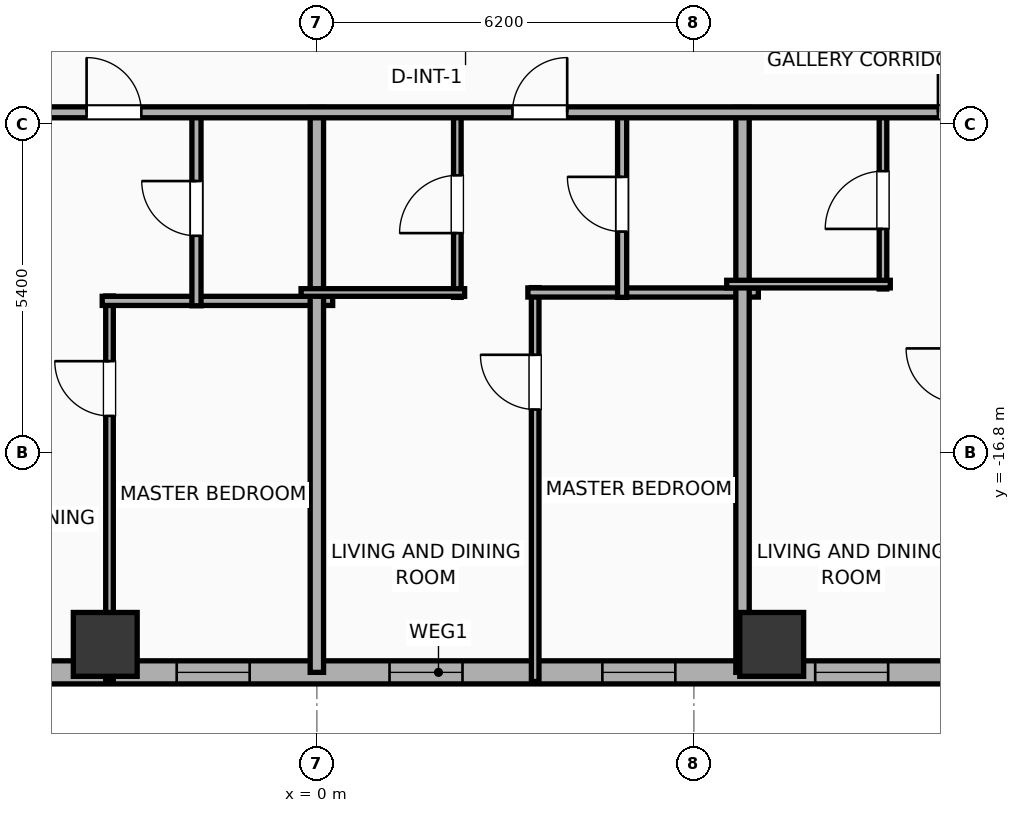
"""IFC4 building model, lengths in metres.
Left out: names, types, materials, properties, quantities, classifications, styles, units other than length and angle.
Written with IfcOpenShell. Run it as: python <this file> out.ifc"""

import sys

from ifc_helpers import new_model, si_unit, direction, frame, frame_2d, origin, origin_2d, place, context, subcontext, project, spatial, rectangle, hollow_rectangle, extrude, element, fill, save


model = new_model("IFC4")
c1 = context("Model", 3, precision=1e-05, world=origin(), true_north=direction((0.0, 1.0)))
c2 = subcontext(c1, "Body", "Model", "MODEL_VIEW")
j1 = project(units=[si_unit("LENGTHUNIT", "METRE"), si_unit("PLANEANGLEUNIT", "RADIAN")], contexts=[c1])
p1 = place(None, origin())
s1 = spatial("IfcSite", under=j1, at=p1, CompositionType="ELEMENT")
p2 = place(p1, origin())
s2 = spatial("IfcBuilding", under=s1, at=p2, CompositionType="ELEMENT")
p3 = place(p2, frame((0.0, 0.0, 120.9)))
s3 = spatial("IfcBuildingStorey", under=s2, at=p3, CompositionType="ELEMENT", Elevation=120.9)
for number, where, z_axis, x_axis in (
    (1, (-3.48, -19.95, 0.0), (0.0, 0.0, 1.0), (1.0, 0.0, 0.0)),
    (2, (7.48, -19.95, 0.0), (0.0, 0.0, 1.0), (1.0, 0.0, 0.0)),
):
    element("IfcColumn", number, at=place(p3, frame(where, z_axis=z_axis, x_axis=x_axis)), inside=s3, PredefinedType="COLUMN", context=c2, shape_type="SweptSolid", body=[
        extrude(hollow_rectangle(XDim=1.05, YDim=1.05, WallThickness=0.036, at=origin_2d()), origin(), (0.0, 0.0, 1.0), 3.9),
    ])
p4 = place(p3, frame((29.381, -20.41, 0.0), z_axis=(0.0, 0.0, 1.0), x_axis=(-1.0, 0.0, 0.0)))
e3 = element("IfcWall", 3, at=p4, inside=s3, PredefinedType="ELEMENTEDWALL", context=c2, shape_type="SweptSolid", body=[
    extrude(rectangle(XDim=54.763, YDim=0.38, at=frame_2d((27.381, 0.0))), origin(), (0.0, 0.0, 1.0), 3.65),
])
p5 = place(p4, frame((5.645, 0.0, 0.75)))
e4 = element("IfcOpeningElement", 4, at=p5, cuts=e3, PredefinedType="OPENING", context=c2, shape_type="SweptSolid", body=[
    extrude(rectangle(XDim=2.4, YDim=2.1, at=frame_2d((1.2, 1.05))), frame((0.0, 0.2, 0.0), z_axis=(0.0, -1.0, 0.0), x_axis=(1.0, 0.0, 0.0)), (0.0, 0.0, 1.0), 0.4),
])
p6 = place(p4, frame((47.567, 0.0, 0.75)))
e5 = element("IfcOpeningElement", 5, at=p6, cuts=e3, PredefinedType="OPENING", context=c2, shape_type="SweptSolid", body=[
    extrude(rectangle(XDim=2.4, YDim=2.1, at=frame_2d((1.2, 1.05))), frame((0.0, 0.2, 0.0), z_axis=(0.0, -1.0, 0.0), x_axis=(1.0, 0.0, 0.0)), (0.0, 0.0, 1.0), 0.4),
])
p7 = place(p4, frame((51.831, 0.0, 0.75)))
e6 = element("IfcOpeningElement", 6, at=p7, cuts=e3, PredefinedType="OPENING", context=c2, shape_type="SweptSolid", body=[
    extrude(rectangle(XDim=1.2, YDim=2.05, at=frame_2d((0.6, 1.025))), frame((0.0, 0.2, 0.0), z_axis=(0.0, -1.0, 0.0), x_axis=(1.0, 0.0, 0.0)), (0.0, 0.0, 1.0), 0.4),
])
p8 = place(p4, frame((44.606, 0.0, 0.75)))
e7 = element("IfcOpeningElement", 7, at=p8, cuts=e3, PredefinedType="OPENING", context=c2, shape_type="SweptSolid", body=[
    extrude(rectangle(XDim=1.2, YDim=2.05, at=frame_2d((0.6, 1.025))), frame((0.0, 0.2, 0.0), z_axis=(0.0, -1.0, 0.0), x_axis=(1.0, 0.0, 0.0)), (0.0, 0.0, 1.0), 0.4),
])
p9 = place(p4, frame((40.986, 0.0, 0.75)))
e8 = element("IfcOpeningElement", 8, at=p9, cuts=e3, PredefinedType="OPENING", context=c2, shape_type="SweptSolid", body=[
    extrude(rectangle(XDim=1.2, YDim=2.05, at=frame_2d((0.6, 1.025))), frame((0.0, 0.2, 0.0), z_axis=(0.0, -1.0, 0.0), x_axis=(1.0, 0.0, 0.0)), (0.0, 0.0, 1.0), 0.4),
])
p10 = place(p4, frame((37.486, 0.0, 0.75)))
e9 = element("IfcOpeningElement", 9, at=p10, cuts=e3, PredefinedType="OPENING", context=c2, shape_type="SweptSolid", body=[
    extrude(rectangle(XDim=1.2, YDim=2.05, at=frame_2d((0.6, 1.025))), frame((0.0, 0.2, 0.0), z_axis=(0.0, -1.0, 0.0), x_axis=(1.0, 0.0, 0.0)), (0.0, 0.0, 1.0), 0.4),
])
p11 = place(p4, frame((33.986, 0.0, 0.75)))
e10 = element("IfcOpeningElement", 10, at=p11, cuts=e3, PredefinedType="OPENING", context=c2, shape_type="SweptSolid", body=[
    extrude(rectangle(XDim=1.2, YDim=2.05, at=frame_2d((0.6, 1.025))), frame((0.0, 0.2, 0.0), z_axis=(0.0, -1.0, 0.0), x_axis=(1.0, 0.0, 0.0)), (0.0, 0.0, 1.0), 0.4),
])
p12 = place(p4, frame((30.486, 0.0, 0.75)))
e11 = element("IfcOpeningElement", 11, at=p12, cuts=e3, PredefinedType="OPENING", context=c2, shape_type="SweptSolid", body=[
    extrude(rectangle(XDim=1.2, YDim=2.05, at=frame_2d((0.6, 1.025))), frame((0.0, 0.2, 0.0), z_axis=(0.0, -1.0, 0.0), x_axis=(1.0, 0.0, 0.0)), (0.0, 0.0, 1.0), 0.4),
])
p13 = place(p4, frame((26.986, 0.0, 0.75)))
e12 = element("IfcOpeningElement", 12, at=p13, cuts=e3, PredefinedType="OPENING", context=c2, shape_type="SweptSolid", body=[
    extrude(rectangle(XDim=1.2, YDim=2.05, at=frame_2d((0.6, 1.025))), frame((0.0, 0.2, 0.0), z_axis=(0.0, -1.0, 0.0), x_axis=(1.0, 0.0, 0.0)), (0.0, 0.0, 1.0), 0.4),
])
p14 = place(p4, frame((23.486, 0.0, 0.75)))
e13 = element("IfcOpeningElement", 13, at=p14, cuts=e3, PredefinedType="OPENING", context=c2, shape_type="SweptSolid", body=[
    extrude(rectangle(XDim=1.2, YDim=2.05, at=frame_2d((0.6, 1.025))), frame((0.0, 0.2, 0.0), z_axis=(0.0, -1.0, 0.0), x_axis=(1.0, 0.0, 0.0)), (0.0, 0.0, 1.0), 0.4),
])
p15 = place(p4, frame((19.986, 0.0, 0.75)))
e14 = element("IfcOpeningElement", 14, at=p15, cuts=e3, PredefinedType="OPENING", context=c2, shape_type="SweptSolid", body=[
    extrude(rectangle(XDim=1.2, YDim=2.05, at=frame_2d((0.6, 1.025))), frame((0.0, 0.2, 0.0), z_axis=(0.0, -1.0, 0.0), x_axis=(1.0, 0.0, 0.0)), (0.0, 0.0, 1.0), 0.4),
])
p16 = place(p4, frame((16.486, 0.0, 0.75)))
e15 = element("IfcOpeningElement", 15, at=p16, cuts=e3, PredefinedType="OPENING", context=c2, shape_type="SweptSolid", body=[
    extrude(rectangle(XDim=1.2, YDim=2.05, at=frame_2d((0.6, 1.025))), frame((0.0, 0.2, 0.0), z_axis=(0.0, -1.0, 0.0), x_axis=(1.0, 0.0, 0.0)), (0.0, 0.0, 1.0), 0.4),
])
p17 = place(p4, frame((11.698, 0.0, 0.75)))
e16 = element("IfcOpeningElement", 16, at=p17, cuts=e3, PredefinedType="OPENING", context=c2, shape_type="SweptSolid", body=[
    extrude(rectangle(XDim=1.2, YDim=2.05, at=frame_2d((0.6, 1.025))), frame((0.0, 0.2, 0.0), z_axis=(0.0, -1.0, 0.0), x_axis=(1.0, 0.0, 0.0)), (0.0, 0.0, 1.0), 0.4),
])
p18 = place(p4, frame((3.172, 0.0, 0.75)))
e17 = element("IfcOpeningElement", 17, at=p18, cuts=e3, PredefinedType="OPENING", context=c2, shape_type="SweptSolid", body=[
    extrude(rectangle(XDim=1.2, YDim=2.05, at=frame_2d((0.6, 1.025))), frame((0.0, 0.2, 0.0), z_axis=(0.0, -1.0, 0.0), x_axis=(1.0, 0.0, 0.0)), (0.0, 0.0, 1.0), 0.4),
])
p19 = place(p4, frame((1.13, 0.0, 0.75)))
e18 = element("IfcOpeningElement", 18, at=p19, cuts=e3, PredefinedType="OPENING", context=c2, shape_type="SweptSolid", body=[
    extrude(rectangle(XDim=1.2, YDim=2.05, at=frame_2d((0.6, 1.025))), frame((0.0, 0.2, 0.0), z_axis=(0.0, -1.0, 0.0), x_axis=(1.0, 0.0, 0.0)), (0.0, 0.0, 1.0), 0.4),
])
p20 = place(p3, frame((-3.41, -20.56, 0.0), z_axis=(0.0, 0.0, 1.0), x_axis=(0.0, 1.0, 0.0)))
e19 = element("IfcWall", 19, at=p20, inside=s3, PredefinedType="PARTITIONING", context=c2, shape_type="SweptSolid", body=[
    extrude(rectangle(XDim=6.339, YDim=0.125, at=frame_2d((3.169, 0.0))), origin(), (0.0, 0.0, 1.0), 3.04),
])
p21 = place(p20, frame((4.368, 0.0, 0.0)))
e20 = element("IfcOpeningElement", 20, at=p21, cuts=e19, PredefinedType="OPENING", context=c2, shape_type="SweptSolid", body=[
    extrude(rectangle(XDim=0.9, YDim=2.05, at=frame_2d((0.45, 1.025))), frame((0.0, 0.073, 0.0), z_axis=(0.0, -1.0, 0.0), x_axis=(1.0, 0.0, 0.0)), (0.0, 0.0, 1.0), 0.145),
])
p22 = place(p3, frame((-3.53, -14.301, 0.0), z_axis=(0.0, 0.0, 1.0), x_axis=(1.0, 0.0, 0.0)))
e21 = element("IfcWall", 21, at=p22, inside=s3, PredefinedType="PLUMBINGWALL", context=c2, shape_type="SweptSolid", body=[
    extrude(rectangle(XDim=3.79, YDim=0.15, at=frame_2d((1.895, 0.0))), origin(), (0.0, 0.0, 1.0), 3.65),
])
p23 = place(p3, frame((-1.98, -14.381, 0.0), z_axis=(0.0, 0.0, 1.0), x_axis=(0.0, 1.0, 0.0)))
e22 = element("IfcWall", 22, at=p23, inside=s3, PredefinedType="PLUMBINGWALL", context=c2, shape_type="SweptSolid", body=[
    extrude(rectangle(XDim=3.201, YDim=0.15, at=frame_2d((1.601, 0.0))), origin(), (0.0, 0.0, 1.0), 3.65),
])
p24 = place(p23, frame((1.15, 0.0, 0.0)))
e23 = element("IfcOpeningElement", 23, at=p24, cuts=e22, PredefinedType="OPENING", context=c2, shape_type="SweptSolid", body=[
    extrude(rectangle(XDim=0.9, YDim=2.05, at=frame_2d((0.45, 1.025))), frame((0.0, 0.085, 0.0), z_axis=(0.0, -1.0, 0.0), x_axis=(1.0, 0.0, 0.0)), (0.0, 0.0, 1.0), 0.17),
])
p25 = place(p3, frame((0.0, -20.41, 0.0), z_axis=(0.0, 0.0, 1.0), x_axis=(0.0, 1.0, 0.0)))
e24 = element("IfcWall", 24, at=p25, inside=s3, PredefinedType="PARTITIONING", context=c2, shape_type="SweptSolid", body=[
    extrude(rectangle(XDim=9.29, YDim=0.22, at=frame_2d((4.645, 0.0))), origin(), (0.0, 0.0, 1.0), 3.65),
])
p26 = place(p3, frame((3.59, -20.56, 0.0), z_axis=(0.0, 0.0, 1.0), x_axis=(0.0, 1.0, 0.0)))
e25 = element("IfcWall", 25, at=p26, inside=s3, PredefinedType="PARTITIONING", context=c2, shape_type="SweptSolid", body=[
    extrude(rectangle(XDim=6.477, YDim=0.125, at=frame_2d((3.239, 0.0))), origin(), (0.0, 0.0, 1.0), 3.65),
])
p27 = place(p26, frame((4.472, 0.0, 0.0)))
e26 = element("IfcOpeningElement", 26, at=p27, cuts=e25, PredefinedType="OPENING", context=c2, shape_type="SweptSolid", body=[
    extrude(rectangle(XDim=0.9, YDim=2.05, at=frame_2d((0.45, 1.025))), frame((0.0, 0.073, 0.0), z_axis=(0.0, -1.0, 0.0), x_axis=(1.0, 0.0, 0.0)), (0.0, 0.0, 1.0), 0.145),
])
p28 = place(p3, frame((3.47, -14.163, 0.0), z_axis=(0.0, 0.0, 1.0), x_axis=(1.0, 0.0, 0.0)))
e27 = element("IfcWall", 27, at=p28, inside=s3, PredefinedType="PLUMBINGWALL", context=c2, shape_type="SweptSolid", body=[
    extrude(rectangle(XDim=3.79, YDim=0.15, at=frame_2d((1.895, 0.0))), origin(), (0.0, 0.0, 1.0), 3.65),
])
p29 = place(p3, frame((2.31, -14.243, 0.0), z_axis=(0.0, 0.0, 1.0), x_axis=(0.0, 1.0, 0.0)))
e28 = element("IfcWall", 28, at=p29, inside=s3, PredefinedType="PARTITIONING", context=c2, shape_type="SweptSolid", body=[
    extrude(rectangle(XDim=3.063, YDim=0.125, at=frame_2d((1.531, 0.0))), origin(), (0.0, 0.0, 1.0), 3.65),
])
p30 = place(p29, frame((1.056, 0.0, 0.0)))
e29 = element("IfcOpeningElement", 29, at=p30, cuts=e28, PredefinedType="OPENING", context=c2, shape_type="SweptSolid", body=[
    extrude(rectangle(XDim=0.95, YDim=2.05, at=frame_2d((0.475, 1.025))), frame((0.0, 0.073, 0.0), z_axis=(0.0, -1.0, 0.0), x_axis=(1.0, 0.0, 0.0)), (0.0, 0.0, 1.0), 0.145),
])
p31 = place(p3, frame((-0.26, -14.163, 0.0), z_axis=(0.0, 0.0, 1.0), x_axis=(1.0, 0.0, 0.0)))
e30 = element("IfcWall", 30, at=p31, inside=s3, PredefinedType="PARTITIONING", context=c2, shape_type="SweptSolid", body=[
    extrude(rectangle(XDim=2.69, YDim=0.125, at=frame_2d((1.345, 0.0))), origin(), (0.0, 0.0, 1.0), 3.65),
])
p32 = place(p3, frame((5.02, -14.243, 0.0), z_axis=(0.0, 0.0, 1.0), x_axis=(0.0, 1.0, 0.0)))
e31 = element("IfcWall", 31, at=p32, inside=s3, PredefinedType="PLUMBINGWALL", context=c2, shape_type="SweptSolid", body=[
    extrude(rectangle(XDim=3.063, YDim=0.15, at=frame_2d((1.531, 0.0))), origin(), (0.0, 0.0, 1.0), 3.65),
])
p33 = place(p32, frame((1.082, 0.0, 0.0)))
e32 = element("IfcOpeningElement", 32, at=p33, cuts=e31, PredefinedType="OPENING", context=c2, shape_type="SweptSolid", body=[
    extrude(rectangle(XDim=0.9, YDim=2.05, at=frame_2d((0.45, 1.025))), frame((0.0, 0.085, 0.0), z_axis=(0.0, -1.0, 0.0), x_axis=(1.0, 0.0, 0.0)), (0.0, 0.0, 1.0), 0.17),
])
p34 = place(p3, frame((7.0, -20.41, 0.0), z_axis=(0.0, 0.0, 1.0), x_axis=(0.0, 1.0, 0.0)))
e33 = element("IfcWall", 33, at=p34, inside=s3, PredefinedType="PARTITIONING", context=c2, shape_type="SweptSolid", body=[
    extrude(rectangle(XDim=9.29, YDim=0.22, at=frame_2d((4.645, 0.0))), origin(), (0.0, 0.0, 1.0), 3.04),
])
p35 = place(p3, frame((9.31, -14.105, 0.0), z_axis=(0.0, 0.0, 1.0), x_axis=(0.0, 1.0, 0.0)))
e34 = element("IfcWall", 34, at=p35, inside=s3, PredefinedType="PARTITIONING", context=c2, shape_type="SweptSolid", body=[
    extrude(rectangle(XDim=2.925, YDim=0.125, at=frame_2d((1.462, 0.0))), origin(), (0.0, 0.0, 1.0), 3.65),
])
p36 = place(p35, frame((0.988, 0.0, 0.0)))
e35 = element("IfcOpeningElement", 35, at=p36, cuts=e34, PredefinedType="OPENING", context=c2, shape_type="SweptSolid", body=[
    extrude(rectangle(XDim=0.95, YDim=2.05, at=frame_2d((0.475, 1.025))), frame((0.0, 0.073, 0.0), z_axis=(0.0, -1.0, 0.0), x_axis=(1.0, 0.0, 0.0)), (0.0, 0.0, 1.0), 0.145),
])
p37 = place(p3, frame((6.74, -14.025, 0.0), z_axis=(0.0, 0.0, 1.0), x_axis=(1.0, 0.0, 0.0)))
e36 = element("IfcWall", 36, at=p37, inside=s3, PredefinedType="PARTITIONING", context=c2, shape_type="SweptSolid", body=[
    extrude(rectangle(XDim=2.69, YDim=0.125, at=frame_2d((1.345, 0.0))), origin(), (0.0, 0.0, 1.0), 3.65),
])
p38 = place(p3, frame((-29.21, -11.2, 0.0), z_axis=(0.0, 0.0, 1.0), x_axis=(1.0, 0.0, 0.0)))
e37 = element("IfcWall", 37, at=p38, inside=s3, PredefinedType="PARTITIONING", context=c2, shape_type="SweptSolid", body=[
    extrude(rectangle(XDim=62.42, YDim=0.18, at=frame_2d((31.21, 0.0))), origin(), (0.0, 0.0, 1.0), 3.65),
])
p39 = place(p38, frame((3.357, 0.0, 0.0)))
e38 = element("IfcOpeningElement", 38, at=p39, cuts=e37, PredefinedType="OPENING", context=c2, shape_type="SweptSolid", body=[
    extrude(rectangle(XDim=1.15, YDim=2.05, at=frame_2d((0.575, 1.025))), frame((0.0, 0.1, 0.0), z_axis=(0.0, -1.0, 0.0), x_axis=(1.0, 0.0, 0.0)), (0.0, 0.0, 1.0), 0.2),
])
p40 = place(p38, frame((10.998, 0.0, 0.0)))
e39 = element("IfcOpeningElement", 39, at=p40, cuts=e37, PredefinedType="OPENING", context=c2, shape_type="SweptSolid", body=[
    extrude(rectangle(XDim=1.15, YDim=2.05, at=frame_2d((0.575, 1.025))), frame((0.0, 0.1, 0.0), z_axis=(0.0, -1.0, 0.0), x_axis=(1.0, 0.0, 0.0)), (0.0, 0.0, 1.0), 0.2),
])
p41 = place(p38, frame((18.426, 0.0, 0.0)))
e40 = element("IfcOpeningElement", 40, at=p41, cuts=e37, PredefinedType="OPENING", context=c2, shape_type="SweptSolid", body=[
    extrude(rectangle(XDim=0.9, YDim=2.05, at=frame_2d((0.45, 1.025))), frame((0.0, 0.1, 0.0), z_axis=(0.0, -1.0, 0.0), x_axis=(1.0, 0.0, 0.0)), (0.0, 0.0, 1.0), 0.2),
])
p42 = place(p38, frame((25.423, 0.0, 0.0)))
e41 = element("IfcOpeningElement", 41, at=p42, cuts=e37, PredefinedType="OPENING", context=c2, shape_type="SweptSolid", body=[
    extrude(rectangle(XDim=0.9, YDim=2.05, at=frame_2d((0.45, 1.025))), frame((0.0, 0.1, 0.0), z_axis=(0.0, -1.0, 0.0), x_axis=(1.0, 0.0, 0.0)), (0.0, 0.0, 1.0), 0.2),
])
p43 = place(p38, frame((32.427, 0.0, 0.0)))
e42 = element("IfcOpeningElement", 42, at=p43, cuts=e37, PredefinedType="OPENING", context=c2, shape_type="SweptSolid", body=[
    extrude(rectangle(XDim=0.9, YDim=2.05, at=frame_2d((0.45, 1.025))), frame((0.0, 0.1, 0.0), z_axis=(0.0, -1.0, 0.0), x_axis=(1.0, 0.0, 0.0)), (0.0, 0.0, 1.0), 0.2),
])
p44 = place(p38, frame((39.424, 0.0, 0.0)))
e43 = element("IfcOpeningElement", 43, at=p44, cuts=e37, PredefinedType="OPENING", context=c2, shape_type="SweptSolid", body=[
    extrude(rectangle(XDim=0.9, YDim=2.05, at=frame_2d((0.45, 1.025))), frame((0.0, 0.1, 0.0), z_axis=(0.0, -1.0, 0.0), x_axis=(1.0, 0.0, 0.0)), (0.0, 0.0, 1.0), 0.2),
])
p45 = place(p38, frame((46.09, 0.0, 0.0)))
e44 = element("IfcOpeningElement", 44, at=p45, cuts=e37, PredefinedType="OPENING", context=c2, shape_type="SweptSolid", body=[
    extrude(rectangle(XDim=0.9, YDim=2.05, at=frame_2d((0.45, 1.025))), frame((0.0, 0.1, 0.0), z_axis=(0.0, -1.0, 0.0), x_axis=(1.0, 0.0, 0.0)), (0.0, 0.0, 1.0), 0.2),
])
p46 = place(p38, frame((51.071, 0.0, 0.0)))
e45 = element("IfcOpeningElement", 45, at=p46, cuts=e37, PredefinedType="OPENING", context=c2, shape_type="SweptSolid", body=[
    extrude(rectangle(XDim=1.15, YDim=2.05, at=frame_2d((0.575, 1.025))), frame((0.0, 0.1, 0.0), z_axis=(0.0, -1.0, 0.0), x_axis=(1.0, 0.0, 0.0)), (0.0, 0.0, 1.0), 0.2),
])
p47 = place(p38, frame((58.93, 0.0, 0.0)))
e46 = element("IfcOpeningElement", 46, at=p47, cuts=e37, PredefinedType="OPENING", context=c2, shape_type="SweptSolid", body=[
    extrude(rectangle(XDim=0.9, YDim=2.05, at=frame_2d((0.45, 1.025))), frame((0.0, 0.1, 0.0), z_axis=(0.0, -1.0, 0.0), x_axis=(1.0, 0.0, 0.0)), (0.0, 0.0, 1.0), 0.2),
])
p48 = place(p12, origin())
e47 = element("IfcWindow", 47, at=p48, inside=s3, PartitioningType="SINGLE_PANEL", PredefinedType="WINDOW", context=c2, shape_type="SweptSolid", body=[
    extrude(rectangle(XDim=1.2, YDim=2.05, at=frame_2d((0.6, 1.025))), frame((0.0, 0.03, 0.0), z_axis=(0.0, -1.0, 0.0), x_axis=(1.0, 0.0, 0.0)), (0.0, 0.0, 1.0), 0.06),
])
fill(e11, e47)
p49 = place(p13, origin())
e48 = element("IfcWindow", 48, at=p49, inside=s3, PartitioningType="SINGLE_PANEL", PredefinedType="WINDOW", context=c2, shape_type="SweptSolid", body=[
    extrude(rectangle(XDim=1.2, YDim=2.05, at=frame_2d((0.6, 1.025))), frame((0.0, 0.03, 0.0), z_axis=(0.0, -1.0, 0.0), x_axis=(1.0, 0.0, 0.0)), (0.0, 0.0, 1.0), 0.06),
])
fill(e12, e48)
p50 = place(p14, origin())
e49 = element("IfcWindow", 49, at=p50, inside=s3, PartitioningType="SINGLE_PANEL", PredefinedType="WINDOW", context=c2, shape_type="SweptSolid", body=[
    extrude(rectangle(XDim=1.2, YDim=2.05, at=frame_2d((0.6, 1.025))), frame((0.0, 0.03, 0.0), z_axis=(0.0, -1.0, 0.0), x_axis=(1.0, 0.0, 0.0)), (0.0, 0.0, 1.0), 0.06),
])
fill(e13, e49)
p51 = place(p15, origin())
e50 = element("IfcWindow", 50, at=p51, inside=s3, PartitioningType="SINGLE_PANEL", PredefinedType="WINDOW", context=c2, shape_type="SweptSolid", body=[
    extrude(rectangle(XDim=1.2, YDim=2.05, at=frame_2d((0.6, 1.025))), frame((0.0, 0.03, 0.0), z_axis=(0.0, -1.0, 0.0), x_axis=(1.0, 0.0, 0.0)), (0.0, 0.0, 1.0), 0.06),
])
fill(e14, e50)
p52 = place(p21, origin())
e51 = element("IfcDoor", 51, at=p52, inside=s3, OperationType="SINGLE_SWING_RIGHT", PredefinedType="DOOR", context=c2, shape_type="SweptSolid", body=[
    extrude(rectangle(XDim=0.9, YDim=2.05, at=frame_2d((0.45, 1.025))), frame((0.0, 0.025, 0.0), z_axis=(0.0, -1.0, 0.0), x_axis=(1.0, 0.0, 0.0)), (0.0, 0.0, 1.0), 0.05),
])
fill(e20, e51)
p53 = place(p24, origin())
e52 = element("IfcDoor", 52, at=p53, inside=s3, OperationType="SINGLE_SWING_RIGHT", PredefinedType="DOOR", context=c2, shape_type="SweptSolid", body=[
    extrude(rectangle(XDim=0.9, YDim=2.05, at=frame_2d((0.45, 1.025))), frame((0.0, 0.025, 0.0), z_axis=(0.0, -1.0, 0.0), x_axis=(1.0, 0.0, 0.0)), (0.0, 0.0, 1.0), 0.05),
])
fill(e23, e52)
p54 = place(p27, origin())
e53 = element("IfcDoor", 53, at=p54, inside=s3, OperationType="SINGLE_SWING_RIGHT", PredefinedType="DOOR", context=c2, shape_type="SweptSolid", body=[
    extrude(rectangle(XDim=0.9, YDim=2.05, at=frame_2d((0.45, 1.025))), frame((0.0, 0.025, 0.0), z_axis=(0.0, -1.0, 0.0), x_axis=(1.0, 0.0, 0.0)), (0.0, 0.0, 1.0), 0.05),
])
fill(e26, e53)
p55 = place(p30, origin())
e54 = element("IfcDoor", 54, at=p55, inside=s3, OperationType="SINGLE_SWING_LEFT", PredefinedType="DOOR", context=c2, shape_type="SweptSolid", body=[
    extrude(rectangle(XDim=0.95, YDim=2.05, at=frame_2d((0.475, 1.025))), frame((0.0, 0.025, 0.0), z_axis=(0.0, -1.0, 0.0), x_axis=(1.0, 0.0, 0.0)), (0.0, 0.0, 1.0), 0.05),
])
fill(e29, e54)
p56 = place(p33, origin())
e55 = element("IfcDoor", 55, at=p56, inside=s3, OperationType="SINGLE_SWING_RIGHT", PredefinedType="DOOR", context=c2, shape_type="SweptSolid", body=[
    extrude(rectangle(XDim=0.9, YDim=2.05, at=frame_2d((0.45, 1.025))), frame((0.0, 0.025, 0.0), z_axis=(0.0, -1.0, 0.0), x_axis=(1.0, 0.0, 0.0)), (0.0, 0.0, 1.0), 0.05),
])
fill(e32, e55)
p57 = place(p36, origin())
e56 = element("IfcDoor", 56, at=p57, inside=s3, OperationType="SINGLE_SWING_LEFT", PredefinedType="DOOR", context=c2, shape_type="SweptSolid", body=[
    extrude(rectangle(XDim=0.95, YDim=2.05, at=frame_2d((0.475, 1.025))), frame((0.0, 0.025, 0.0), z_axis=(0.0, -1.0, 0.0), x_axis=(1.0, 0.0, 0.0)), (0.0, 0.0, 1.0), 0.05),
])
fill(e35, e56)
p58 = place(p42, origin())
e57 = element("IfcDoor", 57, at=p58, inside=s3, OperationType="SINGLE_SWING_LEFT", PredefinedType="DOOR", context=c2, shape_type="SweptSolid", body=[
    extrude(rectangle(XDim=0.9, YDim=2.05, at=frame_2d((0.45, 1.025))), frame((0.0, 0.025, 0.0), z_axis=(0.0, -1.0, 0.0), x_axis=(1.0, 0.0, 0.0)), (0.0, 0.0, 1.0), 0.05),
])
fill(e41, e57)
p59 = place(p43, origin())
e58 = element("IfcDoor", 58, at=p59, inside=s3, OperationType="SINGLE_SWING_RIGHT", PredefinedType="DOOR", context=c2, shape_type="SweptSolid", body=[
    extrude(rectangle(XDim=0.9, YDim=2.05, at=frame_2d((0.45, 1.025))), frame((0.0, 0.025, 0.0), z_axis=(0.0, -1.0, 0.0), x_axis=(1.0, 0.0, 0.0)), (0.0, 0.0, 1.0), 0.05),
])
fill(e42, e58)
p60 = place(p44, origin())
e59 = element("IfcDoor", 59, at=p60, inside=s3, OperationType="SINGLE_SWING_LEFT", PredefinedType="DOOR", context=c2, shape_type="SweptSolid", body=[
    extrude(rectangle(XDim=0.9, YDim=2.05, at=frame_2d((0.45, 1.025))), frame((0.0, 0.025, 0.0), z_axis=(0.0, -1.0, 0.0), x_axis=(1.0, 0.0, 0.0)), (0.0, 0.0, 1.0), 0.05),
])
fill(e43, e59)
save(model, sys.argv[1])
